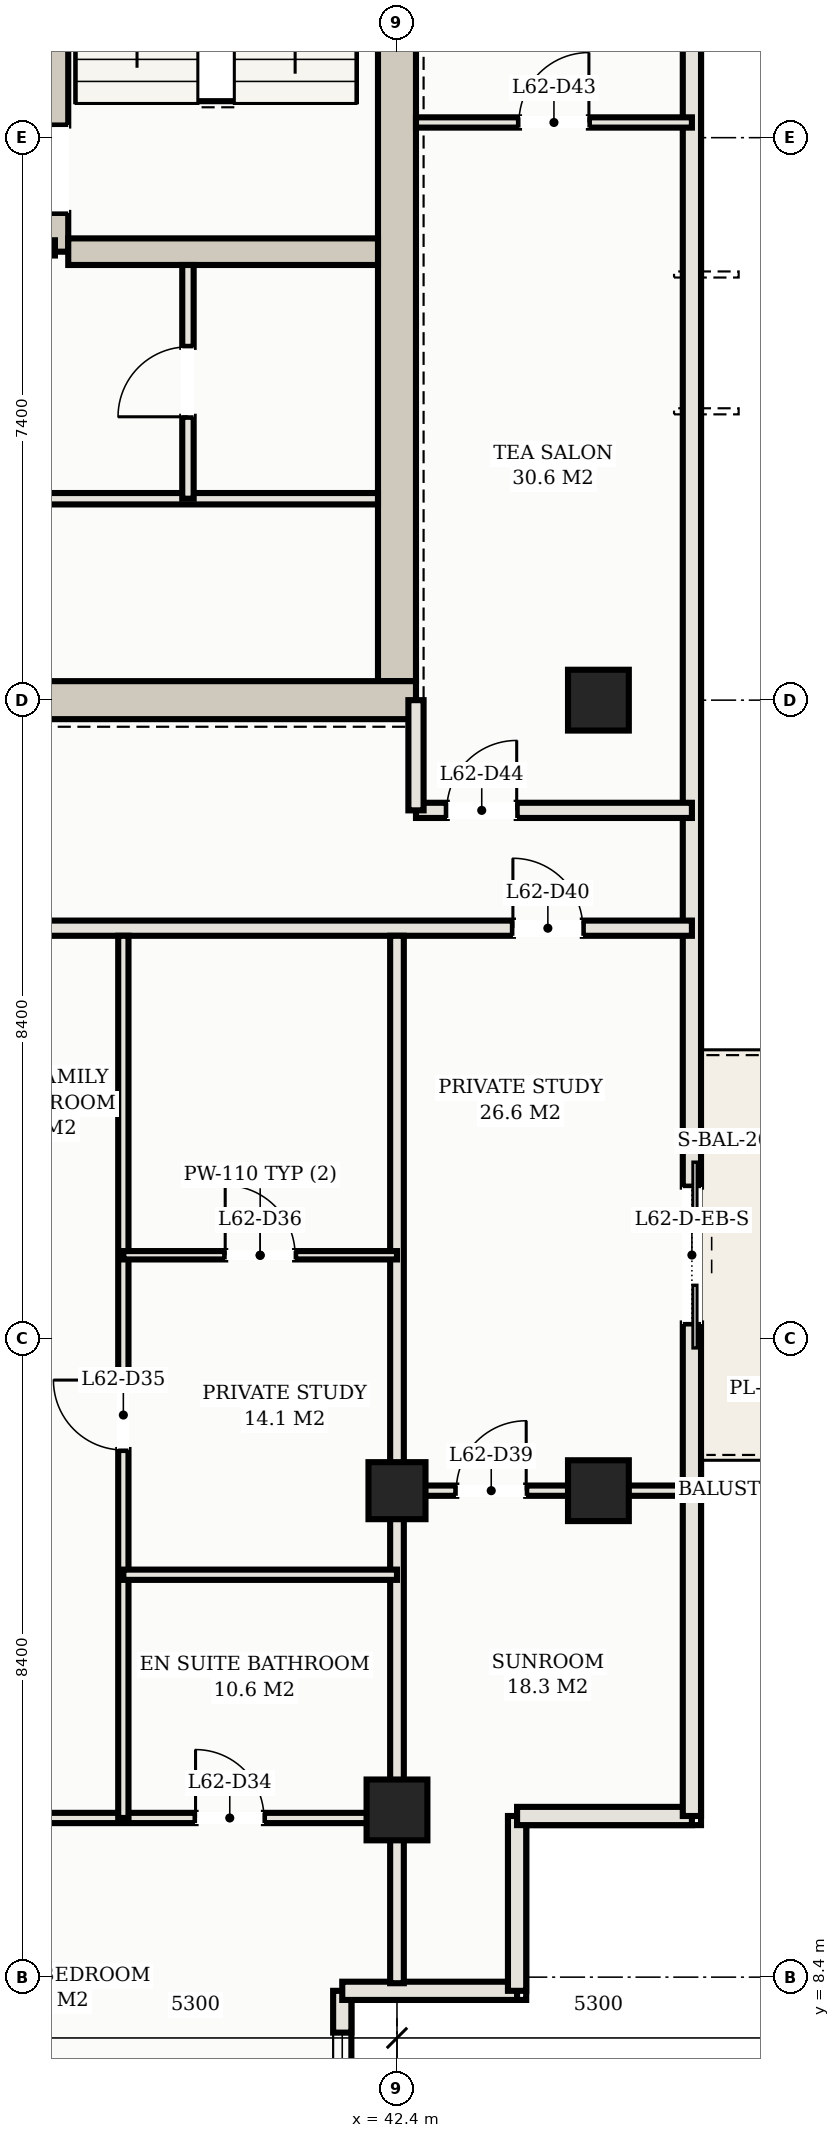
"""IFC4 building model, lengths in metres.
Left out: names, types, materials, properties, quantities, classifications, styles, units other than length and angle.
Written with IfcOpenShell. Run it as: python <this file> out.ifc"""

import sys

from ifc_helpers import new_model, si_unit, direction, frame, frame_2d, origin, origin_2d, place, context, subcontext, project, spatial, rectangle, hollow_rectangle, extrude, element, fill, save


model = new_model("IFC4")
c1 = context("Model", 3, precision=1e-05, world=origin(), true_north=direction((0.0, 1.0)))
c2 = subcontext(c1, "Body", "Model", "MODEL_VIEW")
j1 = project(units=[si_unit("LENGTHUNIT", "METRE"), si_unit("PLANEANGLEUNIT", "RADIAN")], contexts=[c1])
p1 = place(None, origin())
s1 = spatial("IfcSite", under=j1, at=p1, CompositionType="ELEMENT")
p2 = place(p1, origin())
s2 = spatial("IfcBuilding", under=s1, at=p2, CompositionType="ELEMENT")
p3 = place(p2, frame((0.0, 0.0, 226.4)))
s3 = spatial("IfcBuildingStorey", under=s2, at=p3, CompositionType="ELEMENT", Elevation=226.4)
p4 = place(p3, frame((42.4, 25.45, 0.0), z_axis=(0.0, 0.0, 1.0), x_axis=(0.0, 1.0, 0.0)))
e1 = element("IfcWall", 1, at=p4, inside=s3, PredefinedType="SHEAR", context=c2, shape_type="SweptSolid", body=[
    extrude(rectangle(XDim=14.3, YDim=0.5, at=frame_2d((7.15, 0.0))), origin(), (0.0, 0.0, 1.0), 3.11),
])
p5 = place(p3, frame((34.6, 25.2, 0.0), z_axis=(0.0, 0.0, 1.0), x_axis=(1.0, 0.0, 0.0)))
e2 = element("IfcWall", 2, at=p5, inside=s3, PredefinedType="SHEAR", context=c2, shape_type="SweptSolid", body=[
    extrude(rectangle(XDim=8.05, YDim=0.5, at=frame_2d((4.025, 0.0))), origin(), (0.0, 0.0, 1.0), 3.11),
])
p6 = place(p5, frame((0.65, 0.0, 0.0)))
e3 = element("IfcOpeningElement", 3, at=p6, cuts=e2, PredefinedType="OPENING", context=c2, shape_type="SweptSolid", body=[
    extrude(rectangle(XDim=1.25, YDim=2.2, at=frame_2d((0.625, 1.1))), frame((0.0, 0.26, 0.0), z_axis=(0.0, -1.0, 0.0), x_axis=(1.0, 0.0, 0.0)), (0.0, 0.0, 1.0), 0.52),
])
p7 = place(p3, frame((37.9, 31.1, 0.0), z_axis=(0.0, 0.0, 1.0), x_axis=(0.0, 1.0, 0.0)))
e4 = element("IfcWall", 4, at=p7, inside=s3, PredefinedType="SHEAR", context=c2, shape_type="SweptSolid", body=[
    extrude(rectangle(XDim=8.65, YDim=0.35, at=frame_2d((4.325, 0.0))), origin(), (0.0, 0.0, 1.0), 3.11),
])
p8 = place(p7, frame((0.51, 0.0, 0.0)))
e5 = element("IfcOpeningElement", 5, at=p8, cuts=e4, PredefinedType="OPENING", context=c2, shape_type="SweptSolid", body=[
    extrude(rectangle(XDim=1.15, YDim=2.2, at=frame_2d((0.575, 1.1))), frame((0.0, 0.185, 0.0), z_axis=(0.0, -1.0, 0.0), x_axis=(1.0, 0.0, 0.0)), (0.0, 0.0, 1.0), 0.37),
])
p9 = place(p3, frame((38.075, 31.1, 0.0), z_axis=(0.0, 0.0, 1.0), x_axis=(1.0, 0.0, 0.0)))
e6 = element("IfcWall", 6, at=p9, inside=s3, PredefinedType="SHEAR", context=c2, shape_type="SweptSolid", body=[
    extrude(rectangle(XDim=4.075, YDim=0.35, at=frame_2d((2.038, 0.0))), origin(), (0.0, 0.0, 1.0), 3.11),
])
p10 = place(p3, frame((42.4, 14.8, 0.0), z_axis=(0.0, 0.0, 1.0), x_axis=(1.0, 0.0, 0.0)))
e7 = element("IfcColumn", 7, at=p10, inside=s3, PredefinedType="COLUMN", context=c2, shape_type="SweptSolid", body=[
    extrude(hollow_rectangle(XDim=0.75, YDim=0.75, WallThickness=0.025, at=origin_2d()), origin(), (0.0, 0.0, 1.0), 3.3),
])
for number, where, z_axis, x_axis in (
    (8, (42.4, 10.6, 0.0), (0.0, 0.0, 1.0), (1.0, 0.0, 0.0)),
    (9, (45.05, 14.8, 0.0), (0.0, 0.0, 1.0), (1.0, 0.0, 0.0)),
    (10, (45.05, 25.2, 0.0), (0.0, 0.0, 1.0), (1.0, 0.0, 0.0)),
):
    element("IfcColumn", number, at=place(p3, frame(where, z_axis=z_axis, x_axis=x_axis)), inside=s3, PredefinedType="COLUMN", context=c2, shape_type="SweptSolid", body=[
        extrude(hollow_rectangle(XDim=0.8, YDim=0.8, WallThickness=0.028, at=origin_2d()), origin(), (0.0, 0.0, 1.0), 3.3),
    ])
p11 = place(p3, frame((41.68, 5.92, 0.0), z_axis=(0.0, 0.0, 1.0), x_axis=(0.0, 1.0, 0.0)))
e11 = element("IfcWall", 11, at=p11, inside=s3, PredefinedType="SOLIDWALL", context=c2, shape_type="SweptSolid", body=[
    extrude(rectangle(XDim=2.3, YDim=0.24, at=frame_2d((1.15, 0.0))), origin(), (0.0, 0.0, 1.0), 3.11),
])
p12 = place(p11, frame((0.55, 0.0, 0.75)))
e12 = element("IfcOpeningElement", 12, at=p12, cuts=e11, PredefinedType="OPENING", context=c2, shape_type="SweptSolid", body=[
    extrude(rectangle(XDim=1.2, YDim=1.5, at=frame_2d((0.6, 0.75))), frame((0.0, 0.13, 0.0), z_axis=(0.0, -1.0, 0.0), x_axis=(1.0, 0.0, 0.0)), (0.0, 0.0, 1.0), 0.26),
])
for number, where, z_axis, x_axis in (
    (13, (41.68, 8.22, 0.0), (0.0, 0.0, 1.0), (1.0, 0.0, 0.0)),
    (14, (43.98, 8.22, 0.0), (0.0, 0.0, 1.0), (0.0, 1.0, 0.0)),
    (15, (43.98, 10.52, 0.0), (0.0, 0.0, 1.0), (1.0, 0.0, 0.0)),
):
    element("IfcWall", number, at=place(p3, frame(where, z_axis=z_axis, x_axis=x_axis)), inside=s3, PredefinedType="SOLIDWALL", context=c2, shape_type="SweptSolid", body=[
        extrude(rectangle(XDim=2.3, YDim=0.24, at=frame_2d((1.15, 0.0))), origin(), (0.0, 0.0, 1.0), 3.11),
    ])
p13 = place(p3, frame((46.28, 10.52, 0.0), z_axis=(0.0, 0.0, 1.0), x_axis=(0.0, 1.0, 0.0)))
e16 = element("IfcWall", 16, at=p13, inside=s3, PredefinedType="SOLIDWALL", context=c2, shape_type="SweptSolid", body=[
    extrude(rectangle(XDim=26.41, YDim=0.24, at=frame_2d((13.205, 0.0))), origin(), (0.0, 0.0, 1.0), 3.11),
])
p14 = place(p13, frame((6.48, 0.0, 0.0)))
e17 = element("IfcOpeningElement", 17, at=p14, cuts=e16, PredefinedType="OPENING", context=c2, shape_type="SweptSolid", body=[
    extrude(rectangle(XDim=1.8, YDim=2.2, at=frame_2d((0.9, 1.1))), frame((0.0, 0.13, 0.0), z_axis=(0.0, -1.0, 0.0), x_axis=(1.0, 0.0, 0.0)), (0.0, 0.0, 1.0), 0.26),
])
p15 = place(p3, frame((34.65, 31.15, 0.0), z_axis=(0.0, 0.0, 1.0), x_axis=(1.0, 0.0, 0.0)))
e18 = element("IfcWall", 18, at=p15, inside=s3, PredefinedType="PARTITIONING", context=c2, shape_type="SweptSolid", body=[
    extrude(rectangle(XDim=3.25, YDim=0.2, at=frame_2d((1.625, 0.0))), origin(), (0.0, 0.0, 1.0), 2.43),
])
p16 = place(p15, frame((0.725, 0.0, 0.0)))
e19 = element("IfcOpeningElement", 19, at=p16, cuts=e18, PredefinedType="OPENING", context=c2, shape_type="SweptSolid", body=[
    extrude(rectangle(XDim=1.25, YDim=2.2, at=frame_2d((0.625, 1.1))), frame((0.0, 0.11, 0.0), z_axis=(0.0, -1.0, 0.0), x_axis=(1.0, 0.0, 0.0)), (0.0, 0.0, 1.0), 0.22),
])
p17 = place(p3, frame((37.15, 27.85, 0.0), z_axis=(0.0, 0.0, 1.0), x_axis=(1.0, 0.0, 0.0)))
e20 = element("IfcWall", 20, at=p17, inside=s3, PredefinedType="PARTITIONING", context=c2, shape_type="SweptSolid", body=[
    extrude(rectangle(XDim=5.0, YDim=0.15, at=frame_2d((2.5, 0.0))), origin(), (0.0, 0.0, 1.0), 2.43),
])
p18 = place(p3, frame((39.65, 27.85, 0.0), z_axis=(0.0, 0.0, 1.0), x_axis=(0.0, 1.0, 0.0)))
e21 = element("IfcWall", 21, at=p18, inside=s3, PredefinedType="PARTITIONING", context=c2, shape_type="SweptSolid", body=[
    extrude(rectangle(XDim=3.075, YDim=0.15, at=frame_2d((1.538, 0.0))), origin(), (0.0, 0.0, 1.0), 2.43),
])
p19 = place(p18, frame((1.078, 0.0, 0.0)))
e22 = element("IfcOpeningElement", 22, at=p19, cuts=e21, PredefinedType="OPENING", context=c2, shape_type="SweptSolid", body=[
    extrude(rectangle(XDim=0.92, YDim=2.15, at=frame_2d((0.46, 1.075))), frame((0.0, 0.085, 0.0), z_axis=(0.0, -1.0, 0.0), x_axis=(1.0, 0.0, 0.0)), (0.0, 0.0, 1.0), 0.17),
])
p20 = place(p3, frame((6.72, 22.2, 0.0), z_axis=(0.0, 0.0, 1.0), x_axis=(1.0, 0.0, 0.0)))
e23 = element("IfcWall", 23, at=p20, inside=s3, PredefinedType="PARTITIONING", context=c2, shape_type="SweptSolid", body=[
    extrude(rectangle(XDim=39.56, YDim=0.2, at=frame_2d((19.78, 0.0))), origin(), (0.0, 0.0, 1.0), 2.43),
])
p21 = place(p20, frame((4.63, 0.0, 0.0)))
e24 = element("IfcOpeningElement", 24, at=p21, cuts=e23, PredefinedType="OPENING", context=c2, shape_type="SweptSolid", body=[
    extrude(rectangle(XDim=1.1, YDim=2.25, at=frame_2d((0.55, 1.125))), frame((0.0, 0.11, 0.0), z_axis=(0.0, -1.0, 0.0), x_axis=(1.0, 0.0, 0.0)), (0.0, 0.0, 1.0), 0.22),
])
p22 = place(p20, frame((20.53, 0.0, 0.0)))
e25 = element("IfcOpeningElement", 25, at=p22, cuts=e23, PredefinedType="OPENING", context=c2, shape_type="SweptSolid", body=[
    extrude(rectangle(XDim=1.1, YDim=2.25, at=frame_2d((0.55, 1.125))), frame((0.0, 0.11, 0.0), z_axis=(0.0, -1.0, 0.0), x_axis=(1.0, 0.0, 0.0)), (0.0, 0.0, 1.0), 0.22),
])
p23 = place(p20, frame((1.435, 0.0, 0.0)))
e26 = element("IfcOpeningElement", 26, at=p23, cuts=e23, PredefinedType="OPENING", context=c2, shape_type="SweptSolid", body=[
    extrude(rectangle(XDim=0.92, YDim=2.15, at=frame_2d((0.46, 1.075))), frame((0.0, 0.11, 0.0), z_axis=(0.0, -1.0, 0.0), x_axis=(1.0, 0.0, 0.0)), (0.0, 0.0, 1.0), 0.22),
])
p24 = place(p20, frame((37.205, 0.0, 0.0)))
e27 = element("IfcOpeningElement", 27, at=p24, cuts=e23, PredefinedType="OPENING", context=c2, shape_type="SweptSolid", body=[
    extrude(rectangle(XDim=0.92, YDim=2.15, at=frame_2d((0.46, 1.075))), frame((0.0, 0.11, 0.0), z_axis=(0.0, -1.0, 0.0), x_axis=(1.0, 0.0, 0.0)), (0.0, 0.0, 1.0), 0.22),
])
p25 = place(p3, frame((42.65, 23.75, 0.0), z_axis=(0.0, 0.0, 1.0), x_axis=(1.0, 0.0, 0.0)))
e28 = element("IfcWall", 28, at=p25, inside=s3, PredefinedType="PARTITIONING", context=c2, shape_type="SweptSolid", body=[
    extrude(rectangle(XDim=3.63, YDim=0.2, at=frame_2d((1.815, 0.0))), origin(), (0.0, 0.0, 1.0), 2.43),
])
p26 = place(p25, frame((0.405, 0.0, 0.0)))
e29 = element("IfcOpeningElement", 29, at=p26, cuts=e28, PredefinedType="OPENING", context=c2, shape_type="SweptSolid", body=[
    extrude(rectangle(XDim=0.92, YDim=2.15, at=frame_2d((0.46, 1.075))), frame((0.0, 0.11, 0.0), z_axis=(0.0, -1.0, 0.0), x_axis=(1.0, 0.0, 0.0)), (0.0, 0.0, 1.0), 0.22),
])
p27 = place(p3, frame((42.65, 23.75, 0.0), z_axis=(0.0, 0.0, 1.0), x_axis=(0.0, 1.0, 0.0)))
e30 = element("IfcWall", 30, at=p27, inside=s3, PredefinedType="PARTITIONING", context=c2, shape_type="SweptSolid", body=[
    extrude(rectangle(XDim=1.45, YDim=0.2, at=frame_2d((0.725, 0.0))), origin(), (0.0, 0.0, 1.0), 2.43),
])
p28 = place(p3, frame((42.4, 8.32, 0.0), z_axis=(0.0, 0.0, 1.0), x_axis=(0.0, 1.0, 0.0)))
e31 = element("IfcWall", 31, at=p28, inside=s3, PredefinedType="PARTITIONING", context=c2, shape_type="SweptSolid", body=[
    extrude(rectangle(XDim=13.78, YDim=0.18, at=frame_2d((6.89, 0.0))), origin(), (0.0, 0.0, 1.0), 2.43),
])
p29 = place(p3, frame((34.8, 10.494, 0.0), z_axis=(0.0, 0.0, 1.0), x_axis=(1.0, 0.0, 0.0)))
e32 = element("IfcWall", 32, at=p29, inside=s3, PredefinedType="PARTITIONING", context=c2, shape_type="SweptSolid", body=[
    extrude(rectangle(XDim=7.6, YDim=0.135, at=frame_2d((3.8, 0.0))), origin(), (0.0, 0.0, 1.0), 2.43),
])
p30 = place(p29, frame((0.575, 0.0, 0.0)))
e33 = element("IfcOpeningElement", 33, at=p30, cuts=e32, PredefinedType="OPENING", context=c2, shape_type="SweptSolid", body=[
    extrude(rectangle(XDim=0.95, YDim=2.15, at=frame_2d((0.475, 1.075))), frame((0.0, 0.078, 0.0), z_axis=(0.0, -1.0, 0.0), x_axis=(1.0, 0.0, 0.0)), (0.0, 0.0, 1.0), 0.155),
])
p31 = place(p29, frame((4.95, 0.0, 0.0)))
e34 = element("IfcOpeningElement", 34, at=p31, cuts=e32, PredefinedType="OPENING", context=c2, shape_type="SweptSolid", body=[
    extrude(rectangle(XDim=0.9, YDim=2.15, at=frame_2d((0.45, 1.075))), frame((0.0, 0.078, 0.0), z_axis=(0.0, -1.0, 0.0), x_axis=(1.0, 0.0, 0.0)), (0.0, 0.0, 1.0), 0.155),
])
p32 = place(p3, frame((38.8, 10.494, 0.0), z_axis=(0.0, 0.0, 1.0), x_axis=(0.0, 1.0, 0.0)))
e35 = element("IfcWall", 35, at=p32, inside=s3, PredefinedType="PARTITIONING", context=c2, shape_type="SweptSolid", body=[
    extrude(rectangle(XDim=11.606, YDim=0.135, at=frame_2d((5.803, 0.0))), origin(), (0.0, 0.0, 1.0), 2.43),
])
p33 = place(p32, frame((4.841, 0.0, 0.0)))
e36 = element("IfcOpeningElement", 36, at=p33, cuts=e35, PredefinedType="OPENING", context=c2, shape_type="SweptSolid", body=[
    extrude(rectangle(XDim=0.92, YDim=2.15, at=frame_2d((0.46, 1.075))), frame((0.0, 0.078, 0.0), z_axis=(0.0, -1.0, 0.0), x_axis=(1.0, 0.0, 0.0)), (0.0, 0.0, 1.0), 0.155),
])
p34 = place(p3, frame((38.8, 13.694, 0.0), z_axis=(0.0, 0.0, 1.0), x_axis=(1.0, 0.0, 0.0)))
e37 = element("IfcWall", 37, at=p34, inside=s3, PredefinedType="PARTITIONING", context=c2, shape_type="SweptSolid", body=[
    extrude(rectangle(XDim=3.6, YDim=0.135, at=frame_2d((1.8, 0.0))), origin(), (0.0, 0.0, 1.0), 2.43),
])
p35 = place(p3, frame((38.8, 17.897, 0.0), z_axis=(0.0, 0.0, 1.0), x_axis=(1.0, 0.0, 0.0)))
e38 = element("IfcWall", 38, at=p35, inside=s3, PredefinedType="MOVABLE", context=c2, shape_type="SweptSolid", body=[
    extrude(rectangle(XDim=3.6, YDim=0.11, at=frame_2d((1.8, 0.0))), origin(), (0.0, 0.0, 1.0), 2.43),
])
p36 = place(p35, frame((1.34, 0.0, 0.0)))
e39 = element("IfcOpeningElement", 39, at=p36, cuts=e38, PredefinedType="OPENING", context=c2, shape_type="SweptSolid", body=[
    extrude(rectangle(XDim=0.92, YDim=2.15, at=frame_2d((0.46, 1.075))), frame((0.0, 0.065, 0.0), z_axis=(0.0, -1.0, 0.0), x_axis=(1.0, 0.0, 0.0)), (0.0, 0.0, 1.0), 0.13),
])
p37 = place(p3, frame((42.4, 14.8, 0.0), z_axis=(0.0, 0.0, 1.0), x_axis=(1.0, 0.0, 0.0)))
e40 = element("IfcWall", 40, at=p37, inside=s3, PredefinedType="PARTITIONING", context=c2, shape_type="SweptSolid", body=[
    extrude(rectangle(XDim=3.78, YDim=0.135, at=frame_2d((1.89, 0.0))), origin(), (0.0, 0.0, 1.0), 2.43),
])
p38 = place(p37, frame((0.78, 0.0, 0.0)))
e41 = element("IfcOpeningElement", 41, at=p38, cuts=e40, PredefinedType="OPENING", context=c2, shape_type="SweptSolid", body=[
    extrude(rectangle(XDim=0.92, YDim=2.15, at=frame_2d((0.46, 1.075))), frame((0.0, 0.078, 0.0), z_axis=(0.0, -1.0, 0.0), x_axis=(1.0, 0.0, 0.0)), (0.0, 0.0, 1.0), 0.155),
])
p39 = place(p3, frame((42.65, 32.8, 0.0), z_axis=(0.0, 0.0, 1.0), x_axis=(1.0, 0.0, 0.0)))
e42 = element("IfcWall", 42, at=p39, inside=s3, PredefinedType="PARTITIONING", context=c2, shape_type="SweptSolid", body=[
    extrude(rectangle(XDim=3.63, YDim=0.135, at=frame_2d((1.815, 0.0))), origin(), (0.0, 0.0, 1.0), 2.43),
])
p40 = place(p39, frame((1.355, 0.0, 0.0)))
e43 = element("IfcOpeningElement", 43, at=p40, cuts=e42, PredefinedType="OPENING", context=c2, shape_type="SweptSolid", body=[
    extrude(rectangle(XDim=0.92, YDim=2.15, at=frame_2d((0.46, 1.075))), frame((0.0, 0.078, 0.0), z_axis=(0.0, -1.0, 0.0), x_axis=(1.0, 0.0, 0.0)), (0.0, 0.0, 1.0), 0.155),
])
p41 = place(p12, origin())
e44 = element("IfcWindow", 44, at=p41, inside=s3, PartitioningType="SINGLE_PANEL", PredefinedType="WINDOW", context=c2, shape_type="SweptSolid", body=[
    extrude(rectangle(XDim=1.2, YDim=1.5, at=frame_2d((0.6, 0.75))), frame((0.0, 0.03, 0.0), z_axis=(0.0, -1.0, 0.0), x_axis=(1.0, 0.0, 0.0)), (0.0, 0.0, 1.0), 0.06),
])
fill(e12, e44)
p42 = place(p14, frame((1.8, 0.0, 0.0), z_axis=(0.0, 0.0, 1.0), x_axis=(-1.0, 0.0, 0.0)))
e45 = element("IfcDoor", 45, at=p42, inside=s3, OperationType="DOUBLE_DOOR_SLIDING", PredefinedType="DOOR", context=c2, shape_type="SweptSolid", body=[
    extrude(rectangle(XDim=1.8, YDim=2.2, at=frame_2d((0.9, 1.1))), frame((0.0, 0.025, 0.0), z_axis=(0.0, -1.0, 0.0), x_axis=(1.0, 0.0, 0.0)), (0.0, 0.0, 1.0), 0.05),
])
fill(e17, e45)
p43 = place(p8, origin())
e46 = element("IfcDoor", 46, at=p43, inside=s3, OperationType="SINGLE_SWING_RIGHT", PredefinedType="DOOR", context=c2, shape_type="SweptSolid", body=[
    extrude(rectangle(XDim=1.15, YDim=2.2, at=frame_2d((0.575, 1.1))), frame((0.0, 0.025, 0.0), z_axis=(0.0, -1.0, 0.0), x_axis=(1.0, 0.0, 0.0)), (0.0, 0.0, 1.0), 0.05),
])
fill(e5, e46)
p44 = place(p19, origin())
e47 = element("IfcDoor", 47, at=p44, inside=s3, OperationType="SINGLE_SWING_LEFT", PredefinedType="DOOR", context=c2, shape_type="SweptSolid", body=[
    extrude(rectangle(XDim=0.92, YDim=2.15, at=frame_2d((0.46, 1.075))), frame((0.0, 0.025, 0.0), z_axis=(0.0, -1.0, 0.0), x_axis=(1.0, 0.0, 0.0)), (0.0, 0.0, 1.0), 0.05),
])
fill(e22, e47)
p45 = place(p31, origin())
e48 = element("IfcDoor", 48, at=p45, inside=s3, OperationType="SINGLE_SWING_LEFT", PredefinedType="DOOR", context=c2, shape_type="SweptSolid", body=[
    extrude(rectangle(XDim=0.9, YDim=2.15, at=frame_2d((0.45, 1.075))), frame((0.0, 0.025, 0.0), z_axis=(0.0, -1.0, 0.0), x_axis=(1.0, 0.0, 0.0)), (0.0, 0.0, 1.0), 0.05),
])
fill(e34, e48)
p46 = place(p33, origin())
e49 = element("IfcDoor", 49, at=p46, inside=s3, OperationType="SINGLE_SWING_RIGHT", PredefinedType="DOOR", context=c2, shape_type="SweptSolid", body=[
    extrude(rectangle(XDim=0.92, YDim=2.15, at=frame_2d((0.46, 1.075))), frame((0.0, 0.025, 0.0), z_axis=(0.0, -1.0, 0.0), x_axis=(1.0, 0.0, 0.0)), (0.0, 0.0, 1.0), 0.05),
])
fill(e36, e49)
p47 = place(p36, origin())
e50 = element("IfcDoor", 50, at=p47, inside=s3, OperationType="SINGLE_SWING_LEFT", PredefinedType="DOOR", context=c2, shape_type="SweptSolid", body=[
    extrude(rectangle(XDim=0.92, YDim=2.15, at=frame_2d((0.46, 1.075))), frame((0.0, 0.025, 0.0), z_axis=(0.0, -1.0, 0.0), x_axis=(1.0, 0.0, 0.0)), (0.0, 0.0, 1.0), 0.05),
])
fill(e39, e50)
p48 = place(p38, origin())
e51 = element("IfcDoor", 51, at=p48, inside=s3, OperationType="SINGLE_SWING_RIGHT", PredefinedType="DOOR", context=c2, shape_type="SweptSolid", body=[
    extrude(rectangle(XDim=0.92, YDim=2.15, at=frame_2d((0.46, 1.075))), frame((0.0, 0.025, 0.0), z_axis=(0.0, -1.0, 0.0), x_axis=(1.0, 0.0, 0.0)), (0.0, 0.0, 1.0), 0.05),
])
fill(e41, e51)
p49 = place(p24, origin())
e52 = element("IfcDoor", 52, at=p49, inside=s3, OperationType="SINGLE_SWING_LEFT", PredefinedType="DOOR", context=c2, shape_type="SweptSolid", body=[
    extrude(rectangle(XDim=0.92, YDim=2.15, at=frame_2d((0.46, 1.075))), frame((0.0, 0.025, 0.0), z_axis=(0.0, -1.0, 0.0), x_axis=(1.0, 0.0, 0.0)), (0.0, 0.0, 1.0), 0.05),
])
fill(e27, e52)
p50 = place(p40, origin())
e53 = element("IfcDoor", 53, at=p50, inside=s3, OperationType="SINGLE_SWING_RIGHT", PredefinedType="DOOR", context=c2, shape_type="SweptSolid", body=[
    extrude(rectangle(XDim=0.92, YDim=2.15, at=frame_2d((0.46, 1.075))), frame((0.0, 0.025, 0.0), z_axis=(0.0, -1.0, 0.0), x_axis=(1.0, 0.0, 0.0)), (0.0, 0.0, 1.0), 0.05),
])
fill(e43, e53)
p51 = place(p26, origin())
e54 = element("IfcDoor", 54, at=p51, inside=s3, OperationType="SINGLE_SWING_RIGHT", PredefinedType="DOOR", context=c2, shape_type="SweptSolid", body=[
    extrude(rectangle(XDim=0.92, YDim=2.15, at=frame_2d((0.46, 1.075))), frame((0.0, 0.025, 0.0), z_axis=(0.0, -1.0, 0.0), x_axis=(1.0, 0.0, 0.0)), (0.0, 0.0, 1.0), 0.05),
])
fill(e29, e54)
save(model, sys.argv[1])
